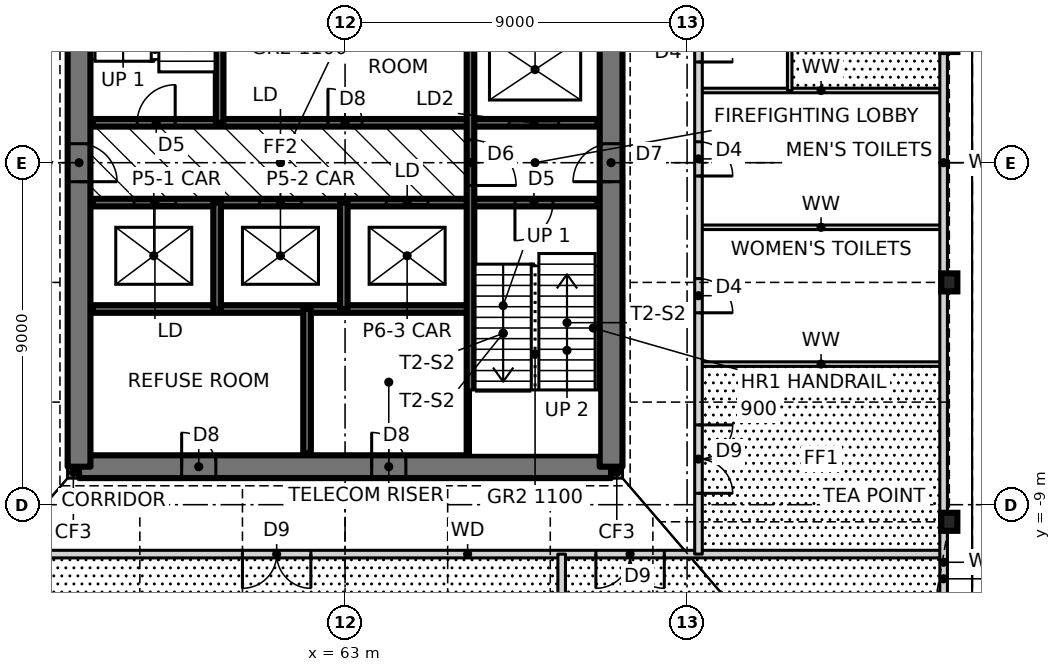
"""IFC4 building model, lengths in metres.
Left out: names, types, materials, properties, quantities, classifications, styles, units other than length and angle.
Written with IfcOpenShell. Run it as: python <this file> out.ifc"""

import sys

from ifc_helpers import new_model, si_unit, direction, frame, frame_2d, origin, origin_2d, place, context, subcontext, project, spatial, rectangle, i_section, extrude, element, fill, save


model = new_model("IFC4")
c1 = context("Model", 3, precision=1e-05, world=origin(), true_north=direction((0.0, 1.0)))
c2 = subcontext(c1, "Body", "Model", "MODEL_VIEW")
j1 = project(units=[si_unit("LENGTHUNIT", "METRE"), si_unit("PLANEANGLEUNIT", "RADIAN")], contexts=[c1])
p1 = place(None, origin())
s1 = spatial("IfcSite", under=j1, at=p1, CompositionType="ELEMENT")
p2 = place(p1, origin())
s2 = spatial("IfcBuilding", under=s1, at=p2, CompositionType="ELEMENT")
p3 = place(p2, frame((0.0, 0.0, 10.5)))
s3 = spatial("IfcBuildingStorey", under=s2, at=p3, CompositionType="ELEMENT", Elevation=10.5)
for number, where, z_axis, x_axis in (
    (1, (78.9, -9.45, 0.0), (0.0, 0.0, 1.0), (1.0, 0.0, 0.0)),
    (2, (78.9, -3.15, 0.0), (0.0, 0.0, 1.0), (1.0, 0.0, 0.0)),
):
    element("IfcColumn", number, at=place(p3, frame(where, z_axis=z_axis, x_axis=x_axis)), inside=s3, PredefinedType="COLUMN", context=c2, shape_type="SweptSolid", body=[
        extrude(i_section(OverallWidth=0.424, OverallDepth=0.475, WebThickness=0.048, FlangeThickness=0.077, at=origin_2d()), origin(), (0.0, 0.0, 1.0), 4.5),
    ])
for number, where, z_axis, x_axis in (
    (3, (55.7, -8.15, 0.0), (0.0, 0.0, 1.0), (1.0, 0.0, 0.0)),
    (4, (70.0, -8.15, 0.0), (0.0, 0.0, 1.0), (1.0, 0.0, 0.0)),
):
    element("IfcWall", number, at=place(p3, frame(where, z_axis=z_axis, x_axis=x_axis)), inside=s3, PredefinedType="SOLIDWALL", context=c2, shape_type="SweptSolid", body=[
        extrude(rectangle(XDim=0.3, YDim=0.3, at=frame_2d((0.15, 0.0))), origin(), (0.0, 0.0, 1.0), 4.5),
    ])
p4 = place(p3, frame((56.0, -8.0, 0.0), z_axis=(0.0, 0.0, 1.0), x_axis=(1.0, 0.0, 0.0)))
e5 = element("IfcWall", 5, at=p4, inside=s3, PredefinedType="SHEAR", context=c2, shape_type="SweptSolid", body=[
    extrude(rectangle(XDim=14.0, YDim=0.6, at=frame_2d((7.0, 0.0))), origin(), (0.0, 0.0, 1.0), 4.5),
])
p5 = place(p4, frame((2.7, 0.0, 0.0)))
e6 = element("IfcOpeningElement", 6, at=p5, cuts=e5, PredefinedType="OPENING", context=c2, shape_type="SweptSolid", body=[
    extrude(rectangle(XDim=0.9, YDim=2.1, at=frame_2d((0.45, 1.05))), frame((0.0, 0.31, 0.0), z_axis=(0.0, -1.0, 0.0), x_axis=(1.0, 0.0, 0.0)), (0.0, 0.0, 1.0), 0.62),
])
p6 = place(p4, frame((7.7, 0.0, 0.0)))
e7 = element("IfcOpeningElement", 7, at=p6, cuts=e5, PredefinedType="OPENING", context=c2, shape_type="SweptSolid", body=[
    extrude(rectangle(XDim=0.9, YDim=2.1, at=frame_2d((0.45, 1.05))), frame((0.0, 0.31, 0.0), z_axis=(0.0, -1.0, 0.0), x_axis=(1.0, 0.0, 0.0)), (0.0, 0.0, 1.0), 0.62),
])
p7 = place(p3, frame((70.0, -8.0, 0.0), z_axis=(0.0, 0.0, 1.0), x_axis=(0.0, 1.0, 0.0)))
e8 = element("IfcWall", 8, at=p7, inside=s3, PredefinedType="SHEAR", context=c2, shape_type="SweptSolid", body=[
    extrude(rectangle(XDim=16.0, YDim=0.6, at=frame_2d((8.0, 0.0))), origin(), (0.0, 0.0, 1.0), 4.5),
])
p8 = place(p7, frame((7.5, 0.0, 0.0)))
e9 = element("IfcOpeningElement", 9, at=p8, cuts=e8, PredefinedType="OPENING", context=c2, shape_type="SweptSolid", body=[
    extrude(rectangle(XDim=1.0, YDim=2.1, at=frame_2d((0.5, 1.05))), frame((0.0, 0.31, 0.0), z_axis=(0.0, -1.0, 0.0), x_axis=(1.0, 0.0, 0.0)), (0.0, 0.0, 1.0), 0.62),
])
p9 = place(p3, frame((56.0, 8.0, 0.0), z_axis=(0.0, 0.0, 1.0), x_axis=(0.0, -1.0, 0.0)))
e10 = element("IfcWall", 10, at=p9, inside=s3, PredefinedType="SHEAR", context=c2, shape_type="SweptSolid", body=[
    extrude(rectangle(XDim=16.0, YDim=0.6, at=frame_2d((8.0, 0.0))), origin(), (0.0, 0.0, 1.0), 4.5),
])
p10 = place(p9, frame((7.5, 0.0, 0.0)))
e11 = element("IfcOpeningElement", 11, at=p10, cuts=e10, PredefinedType="OPENING", context=c2, shape_type="SweptSolid", body=[
    extrude(rectangle(XDim=1.0, YDim=2.1, at=frame_2d((0.5, 1.05))), frame((0.0, 0.31, 0.0), z_axis=(0.0, -1.0, 0.0), x_axis=(1.0, 0.0, 0.0)), (0.0, 0.0, 1.0), 0.62),
])
p11 = place(p3, frame((53.7, -10.3, 0.0), z_axis=(0.0, 0.0, 1.0), x_axis=(1.0, 0.0, 0.0)))
e12 = element("IfcWall", 12, at=p11, inside=s3, PredefinedType="SOLIDWALL", context=c2, shape_type="SweptSolid", body=[
    extrude(rectangle(XDim=25.05, YDim=0.2, at=frame_2d((12.525, 0.0))), origin(), (0.0, 0.0, 1.0), 4.25),
])
p12 = place(p11, frame((6.6, 0.0, 0.0)))
e13 = element("IfcOpeningElement", 13, at=p12, cuts=e12, PredefinedType="OPENING", context=c2, shape_type="SweptSolid", body=[
    extrude(rectangle(XDim=1.8, YDim=2.1, at=frame_2d((0.9, 1.05))), frame((0.0, 0.11, 0.0), z_axis=(0.0, -1.0, 0.0), x_axis=(1.0, 0.0, 0.0)), (0.0, 0.0, 1.0), 0.22),
])
p13 = place(p11, frame((15.9, 0.0, 0.0)))
e14 = element("IfcOpeningElement", 14, at=p13, cuts=e12, PredefinedType="OPENING", context=c2, shape_type="SweptSolid", body=[
    extrude(rectangle(XDim=1.8, YDim=2.1, at=frame_2d((0.9, 1.05))), frame((0.0, 0.11, 0.0), z_axis=(0.0, -1.0, 0.0), x_axis=(1.0, 0.0, 0.0)), (0.0, 0.0, 1.0), 0.22),
])
p14 = place(p3, frame((72.3, -5.3, 0.0), z_axis=(0.0, 0.0, 1.0), x_axis=(1.0, 0.0, 0.0)))
e15 = element("IfcWall", 15, at=p14, inside=s3, PredefinedType="PARTITIONING", context=c2, shape_type="SweptSolid", body=[
    extrude(rectangle(XDim=6.45, YDim=0.12, at=frame_2d((3.225, 0.0))), origin(), (0.0, 0.0, 1.0), 4.25),
])
p15 = place(p3, frame((56.36, -3.85, 0.0), z_axis=(0.0, 0.0, 1.0), x_axis=(1.0, 0.0, 0.0)))
e16 = element("IfcWall", 16, at=p15, inside=s3, PredefinedType="SOLIDWALL", context=c2, shape_type="SweptSolid", body=[
    extrude(rectangle(XDim=9.94, YDim=0.2, at=frame_2d((4.97, 0.0))), origin(), (0.0, 0.0, 1.0), 4.5),
])
p16 = place(p3, frame((72.3, -1.7, 0.0), z_axis=(0.0, 0.0, 1.0), x_axis=(1.0, 0.0, 0.0)))
e17 = element("IfcWall", 17, at=p16, inside=s3, PredefinedType="PARTITIONING", context=c2, shape_type="SweptSolid", body=[
    extrude(rectangle(XDim=6.45, YDim=0.12, at=frame_2d((3.225, 0.0))), origin(), (0.0, 0.0, 1.0), 4.25),
])
p17 = place(p3, frame((56.36, -1.05, 0.0), z_axis=(0.0, 0.0, 1.0), x_axis=(1.0, 0.0, 0.0)))
e18 = element("IfcWall", 18, at=p17, inside=s3, PredefinedType="SOLIDWALL", context=c2, shape_type="SweptSolid", body=[
    extrude(rectangle(XDim=13.28, YDim=0.2, at=frame_2d((6.64, 0.0))), origin(), (0.0, 0.0, 1.0), 4.5),
])
p18 = place(p17, frame((11.11, 0.0, 0.0)))
e19 = element("IfcOpeningElement", 19, at=p18, cuts=e18, PredefinedType="OPENING", context=c2, shape_type="SweptSolid", body=[
    extrude(rectangle(XDim=1.0, YDim=2.1, at=frame_2d((0.5, 1.05))), frame((0.0, 0.11, 0.0), z_axis=(0.0, -1.0, 0.0), x_axis=(1.0, 0.0, 0.0)), (0.0, 0.0, 1.0), 0.22),
])
p19 = place(p17, frame((1.087, 0.0, 0.0)))
e20 = element("IfcOpeningElement", 20, at=p19, cuts=e18, PredefinedType="OPENING", context=c2, shape_type="SweptSolid", body=[
    extrude(rectangle(XDim=1.1, YDim=2.1, at=frame_2d((0.55, 1.05))), frame((0.0, 0.11, 0.0), z_axis=(0.0, -1.0, 0.0), x_axis=(1.0, 0.0, 0.0)), (0.0, 0.0, 1.0), 0.22),
])
p20 = place(p17, frame((4.39, 0.0, 0.0)))
e21 = element("IfcOpeningElement", 21, at=p20, cuts=e18, PredefinedType="OPENING", context=c2, shape_type="SweptSolid", body=[
    extrude(rectangle(XDim=1.1, YDim=2.1, at=frame_2d((0.55, 1.05))), frame((0.0, 0.11, 0.0), z_axis=(0.0, -1.0, 0.0), x_axis=(1.0, 0.0, 0.0)), (0.0, 0.0, 1.0), 0.22),
])
p21 = place(p17, frame((7.724, 0.0, 0.0)))
e22 = element("IfcOpeningElement", 22, at=p21, cuts=e18, PredefinedType="OPENING", context=c2, shape_type="SweptSolid", body=[
    extrude(rectangle(XDim=1.1, YDim=2.1, at=frame_2d((0.55, 1.05))), frame((0.0, 0.11, 0.0), z_axis=(0.0, -1.0, 0.0), x_axis=(1.0, 0.0, 0.0)), (0.0, 0.0, 1.0), 0.22),
])
p22 = place(p3, frame((56.36, 1.05, 0.0), z_axis=(0.0, 0.0, 1.0), x_axis=(1.0, 0.0, 0.0)))
e23 = element("IfcWall", 23, at=p22, inside=s3, PredefinedType="SOLIDWALL", context=c2, shape_type="SweptSolid", body=[
    extrude(rectangle(XDim=13.28, YDim=0.2, at=frame_2d((6.64, 0.0))), origin(), (0.0, 0.0, 1.0), 4.5),
])
p23 = place(p22, frame((1.17, 0.0, 0.0)))
e24 = element("IfcOpeningElement", 24, at=p23, cuts=e23, PredefinedType="OPENING", context=c2, shape_type="SweptSolid", body=[
    extrude(rectangle(XDim=1.0, YDim=2.1, at=frame_2d((0.5, 1.05))), frame((0.0, 0.11, 0.0), z_axis=(0.0, -1.0, 0.0), x_axis=(1.0, 0.0, 0.0)), (0.0, 0.0, 1.0), 0.22),
])
p24 = place(p22, frame((6.19, 0.0, 0.0)))
e25 = element("IfcOpeningElement", 25, at=p24, cuts=e23, PredefinedType="OPENING", context=c2, shape_type="SweptSolid", body=[
    extrude(rectangle(XDim=0.9, YDim=2.1, at=frame_2d((0.45, 1.05))), frame((0.0, 0.11, 0.0), z_axis=(0.0, -1.0, 0.0), x_axis=(1.0, 0.0, 0.0)), (0.0, 0.0, 1.0), 0.22),
])
p25 = place(p22, frame((10.96, 0.0, 0.0)))
e26 = element("IfcOpeningElement", 26, at=p25, cuts=e23, PredefinedType="OPENING", context=c2, shape_type="SweptSolid", body=[
    extrude(rectangle(XDim=1.3, YDim=2.1, at=frame_2d((0.65, 1.05))), frame((0.0, 0.11, 0.0), z_axis=(0.0, -1.0, 0.0), x_axis=(1.0, 0.0, 0.0)), (0.0, 0.0, 1.0), 0.22),
])
p26 = place(p3, frame((72.3, 1.9, 0.0), z_axis=(0.0, 0.0, 1.0), x_axis=(1.0, 0.0, 0.0)))
e27 = element("IfcWall", 27, at=p26, inside=s3, PredefinedType="PARTITIONING", context=c2, shape_type="SweptSolid", body=[
    extrude(rectangle(XDim=6.45, YDim=0.12, at=frame_2d((3.225, 0.0))), origin(), (0.0, 0.0, 1.0), 4.25),
])
p27 = place(p3, frame((74.7, 1.9, 0.0), z_axis=(0.0, 0.0, 1.0), x_axis=(0.0, 1.0, 0.0)))
e28 = element("IfcWall", 28, at=p27, inside=s3, PredefinedType="PARTITIONING", context=c2, shape_type="SweptSolid", body=[
    extrude(rectangle(XDim=2.4, YDim=0.12, at=frame_2d((1.2, 0.0))), origin(), (0.0, 0.0, 1.0), 4.25),
])
p28 = place(p3, frame((72.3, -10.3, 0.0), z_axis=(0.0, 0.0, 1.0), x_axis=(0.0, 1.0, 0.0)))
e29 = element("IfcWall", 29, at=p28, inside=s3, PredefinedType="SOLIDWALL", context=c2, shape_type="SweptSolid", body=[
    extrude(rectangle(XDim=28.3, YDim=0.2, at=frame_2d((14.15, 0.0))), origin(), (0.0, 0.0, 1.0), 4.25),
])
p29 = place(p28, frame((1.6, 0.0, 0.0)))
e30 = element("IfcOpeningElement", 30, at=p29, cuts=e29, PredefinedType="OPENING", context=c2, shape_type="SweptSolid", body=[
    extrude(rectangle(XDim=1.8, YDim=2.1, at=frame_2d((0.9, 1.05))), frame((0.0, 0.11, 0.0), z_axis=(0.0, -1.0, 0.0), x_axis=(1.0, 0.0, 0.0)), (0.0, 0.0, 1.0), 0.22),
])
p30 = place(p28, frame((6.35, 0.0, 0.0)))
e31 = element("IfcOpeningElement", 31, at=p30, cuts=e29, PredefinedType="OPENING", context=c2, shape_type="SweptSolid", body=[
    extrude(rectangle(XDim=0.9, YDim=2.1, at=frame_2d((0.45, 1.05))), frame((0.0, 0.11, 0.0), z_axis=(0.0, -1.0, 0.0), x_axis=(1.0, 0.0, 0.0)), (0.0, 0.0, 1.0), 0.22),
])
p31 = place(p28, frame((9.95, 0.0, 0.0)))
e32 = element("IfcOpeningElement", 32, at=p31, cuts=e29, PredefinedType="OPENING", context=c2, shape_type="SweptSolid", body=[
    extrude(rectangle(XDim=0.9, YDim=2.1, at=frame_2d((0.45, 1.05))), frame((0.0, 0.11, 0.0), z_axis=(0.0, -1.0, 0.0), x_axis=(1.0, 0.0, 0.0)), (0.0, 0.0, 1.0), 0.22),
])
p32 = place(p28, frame((12.95, 0.0, 0.0)))
e33 = element("IfcOpeningElement", 33, at=p32, cuts=e29, PredefinedType="OPENING", context=c2, shape_type="SweptSolid", body=[
    extrude(rectangle(XDim=0.9, YDim=2.1, at=frame_2d((0.45, 1.05))), frame((0.0, 0.11, 0.0), z_axis=(0.0, -1.0, 0.0), x_axis=(1.0, 0.0, 0.0)), (0.0, 0.0, 1.0), 0.22),
])
p33 = place(p28, frame((16.7, 0.0, 0.0)))
e34 = element("IfcOpeningElement", 34, at=p33, cuts=e29, PredefinedType="OPENING", context=c2, shape_type="SweptSolid", body=[
    extrude(rectangle(XDim=1.8, YDim=2.1, at=frame_2d((0.9, 1.05))), frame((0.0, 0.11, 0.0), z_axis=(0.0, -1.0, 0.0), x_axis=(1.0, 0.0, 0.0)), (0.0, 0.0, 1.0), 0.22),
])
p34 = place(p3, frame((68.7, -18.0, 0.0), z_axis=(0.0, 0.0, 1.0), x_axis=(0.0, 1.0, 0.0)))
e35 = element("IfcWall", 35, at=p34, inside=s3, PredefinedType="SOLIDWALL", context=c2, shape_type="SweptSolid", body=[
    extrude(rectangle(XDim=7.7, YDim=0.2, at=frame_2d((3.85, 0.0))), origin(), (0.0, 0.0, 1.0), 4.25),
])
p35 = place(p3, frame((66.3, -7.64, 0.0), z_axis=(0.0, 0.0, 1.0), x_axis=(0.0, 1.0, 0.0)))
e36 = element("IfcWall", 36, at=p35, inside=s3, PredefinedType="SOLIDWALL", context=c2, shape_type="SweptSolid", body=[
    extrude(rectangle(XDim=11.49, YDim=0.2, at=frame_2d((5.745, 0.0))), origin(), (0.0, 0.0, 1.0), 4.5),
])
p36 = place(p35, frame((7.04, 0.0, 0.0)))
e37 = element("IfcOpeningElement", 37, at=p36, cuts=e36, PredefinedType="OPENING", context=c2, shape_type="SweptSolid", body=[
    extrude(rectangle(XDim=1.2, YDim=2.1, at=frame_2d((0.6, 1.05))), frame((0.0, 0.11, 0.0), z_axis=(0.0, -1.0, 0.0), x_axis=(1.0, 0.0, 0.0)), (0.0, 0.0, 1.0), 0.22),
])
p37 = place(p3, frame((62.967, -3.85, 0.0), z_axis=(0.0, 0.0, 1.0), x_axis=(0.0, 1.0, 0.0)))
e38 = element("IfcWall", 38, at=p37, inside=s3, PredefinedType="SOLIDWALL", context=c2, shape_type="SweptSolid", body=[
    extrude(rectangle(XDim=2.8, YDim=0.2, at=frame_2d((1.4, 0.0))), origin(), (0.0, 0.0, 1.0), 4.5),
])
p38 = place(p3, frame((62.0, -7.64, 0.0), z_axis=(0.0, 0.0, 1.0), x_axis=(0.0, 1.0, 0.0)))
e39 = element("IfcWall", 39, at=p38, inside=s3, PredefinedType="SOLIDWALL", context=c2, shape_type="SweptSolid", body=[
    extrude(rectangle(XDim=3.79, YDim=0.2, at=frame_2d((1.895, 0.0))), origin(), (0.0, 0.0, 1.0), 4.5),
])
p39 = place(p3, frame((59.7, 1.05, 0.0), z_axis=(0.0, 0.0, 1.0), x_axis=(0.0, 1.0, 0.0)))
e40 = element("IfcWall", 40, at=p39, inside=s3, PredefinedType="SOLIDWALL", context=c2, shape_type="SweptSolid", body=[
    extrude(rectangle(XDim=6.59, YDim=0.2, at=frame_2d((3.295, 0.0))), origin(), (0.0, 0.0, 1.0), 4.5),
])
p40 = place(p3, frame((59.633, -3.85, 0.0), z_axis=(0.0, 0.0, 1.0), x_axis=(0.0, 1.0, 0.0)))
e41 = element("IfcWall", 41, at=p40, inside=s3, PredefinedType="SOLIDWALL", context=c2, shape_type="SweptSolid", body=[
    extrude(rectangle(XDim=2.8, YDim=0.2, at=frame_2d((1.4, 0.0))), origin(), (0.0, 0.0, 1.0), 4.5),
])
p41 = place(p3, frame((78.75, -11.602, 0.0), z_axis=(0.0, 0.0, 1.0), x_axis=(0.0, 1.0, 0.0)))
e42 = element("IfcWall", 42, at=p41, inside=s3, PredefinedType="SOLIDWALL", context=c2, shape_type="SweptSolid", body=[
    extrude(rectangle(XDim=2.174, YDim=0.2, at=frame_2d((1.087, 0.0))), origin(), (0.0, 0.0, 1.0), 3.587),
])
p42 = place(p3, frame((78.75, -9.428, 0.0), z_axis=(0.0, 0.0, 1.0), x_axis=(0.0, 1.0, 0.0)))
e43 = element("IfcWall", 43, at=p42, inside=s3, PredefinedType="SOLIDWALL", context=c2, shape_type="SweptSolid", body=[
    extrude(rectangle(XDim=18.856, YDim=0.2, at=frame_2d((9.428, 0.0))), origin(), (0.0, 0.0, 1.0), 4.25),
])
p43 = place(p23, origin())
e44 = element("IfcDoor", 44, at=p43, inside=s3, OperationType="SINGLE_SWING_RIGHT", PredefinedType="DOOR", context=c2, shape_type="SweptSolid", body=[
    extrude(rectangle(XDim=1.0, YDim=2.1, at=frame_2d((0.5, 1.05))), frame((0.0, 0.025, 0.0), z_axis=(0.0, -1.0, 0.0), x_axis=(1.0, 0.0, 0.0)), (0.0, 0.0, 1.0), 0.05),
])
fill(e24, e44)
p44 = place(p18, frame((1.0, 0.0, 0.0), z_axis=(0.0, 0.0, 1.0), x_axis=(-1.0, 0.0, 0.0)))
e45 = element("IfcDoor", 45, at=p44, inside=s3, OperationType="SINGLE_SWING_RIGHT", PredefinedType="DOOR", context=c2, shape_type="SweptSolid", body=[
    extrude(rectangle(XDim=1.0, YDim=2.1, at=frame_2d((0.5, 1.05))), frame((0.0, 0.025, 0.0), z_axis=(0.0, -1.0, 0.0), x_axis=(1.0, 0.0, 0.0)), (0.0, 0.0, 1.0), 0.05),
])
fill(e19, e45)
p45 = place(p36, frame((1.2, 0.0, 0.0), z_axis=(0.0, 0.0, 1.0), x_axis=(-1.0, 0.0, 0.0)))
e46 = element("IfcDoor", 46, at=p45, inside=s3, OperationType="SINGLE_SWING_RIGHT", PredefinedType="DOOR", context=c2, shape_type="SweptSolid", body=[
    extrude(rectangle(XDim=1.2, YDim=2.1, at=frame_2d((0.6, 1.05))), frame((0.0, 0.025, 0.0), z_axis=(0.0, -1.0, 0.0), x_axis=(1.0, 0.0, 0.0)), (0.0, 0.0, 1.0), 0.05),
])
fill(e37, e46)
p46 = place(p24, origin())
e47 = element("IfcDoor", 47, at=p46, inside=s3, OperationType="SINGLE_SWING_LEFT", PredefinedType="DOOR", context=c2, shape_type="SweptSolid", body=[
    extrude(rectangle(XDim=0.9, YDim=2.1, at=frame_2d((0.45, 1.05))), frame((0.0, 0.025, 0.0), z_axis=(0.0, -1.0, 0.0), x_axis=(1.0, 0.0, 0.0)), (0.0, 0.0, 1.0), 0.05),
])
fill(e25, e47)
p47 = place(p12, frame((1.8, 0.0, 0.0), z_axis=(0.0, 0.0, 1.0), x_axis=(-1.0, 0.0, 0.0)))
e48 = element("IfcDoor", 48, at=p47, inside=s3, OperationType="DOUBLE_DOOR_SINGLE_SWING", PredefinedType="DOOR", context=c2, shape_type="SweptSolid", body=[
    extrude(rectangle(XDim=1.8, YDim=2.1, at=frame_2d((0.9, 1.05))), frame((0.0, 0.025, 0.0), z_axis=(0.0, -1.0, 0.0), x_axis=(1.0, 0.0, 0.0)), (0.0, 0.0, 1.0), 0.05),
])
fill(e13, e48)
p48 = place(p13, frame((1.8, 0.0, 0.0), z_axis=(0.0, 0.0, 1.0), x_axis=(-1.0, 0.0, 0.0)))
e49 = element("IfcDoor", 49, at=p48, inside=s3, OperationType="DOUBLE_DOOR_SINGLE_SWING", PredefinedType="DOOR", context=c2, shape_type="SweptSolid", body=[
    extrude(rectangle(XDim=1.8, YDim=2.1, at=frame_2d((0.9, 1.05))), frame((0.0, 0.025, 0.0), z_axis=(0.0, -1.0, 0.0), x_axis=(1.0, 0.0, 0.0)), (0.0, 0.0, 1.0), 0.05),
])
fill(e14, e49)
p49 = place(p29, frame((1.8, 0.0, 0.0), z_axis=(0.0, 0.0, 1.0), x_axis=(-1.0, 0.0, 0.0)))
e50 = element("IfcDoor", 50, at=p49, inside=s3, OperationType="DOUBLE_DOOR_SINGLE_SWING", PredefinedType="DOOR", context=c2, shape_type="SweptSolid", body=[
    extrude(rectangle(XDim=1.8, YDim=2.1, at=frame_2d((0.9, 1.05))), frame((0.0, 0.025, 0.0), z_axis=(0.0, -1.0, 0.0), x_axis=(1.0, 0.0, 0.0)), (0.0, 0.0, 1.0), 0.05),
])
fill(e30, e50)
p50 = place(p30, frame((0.9, 0.0, 0.0), z_axis=(0.0, 0.0, 1.0), x_axis=(-1.0, 0.0, 0.0)))
e51 = element("IfcDoor", 51, at=p50, inside=s3, OperationType="SINGLE_SWING_RIGHT", PredefinedType="DOOR", context=c2, shape_type="SweptSolid", body=[
    extrude(rectangle(XDim=0.9, YDim=2.1, at=frame_2d((0.45, 1.05))), frame((0.0, 0.025, 0.0), z_axis=(0.0, -1.0, 0.0), x_axis=(1.0, 0.0, 0.0)), (0.0, 0.0, 1.0), 0.05),
])
fill(e31, e51)
p51 = place(p31, frame((0.9, 0.0, 0.0), z_axis=(0.0, 0.0, 1.0), x_axis=(-1.0, 0.0, 0.0)))
e52 = element("IfcDoor", 52, at=p51, inside=s3, OperationType="SINGLE_SWING_RIGHT", PredefinedType="DOOR", context=c2, shape_type="SweptSolid", body=[
    extrude(rectangle(XDim=0.9, YDim=2.1, at=frame_2d((0.45, 1.05))), frame((0.0, 0.025, 0.0), z_axis=(0.0, -1.0, 0.0), x_axis=(1.0, 0.0, 0.0)), (0.0, 0.0, 1.0), 0.05),
])
fill(e32, e52)
p52 = place(p32, frame((0.9, 0.0, 0.0), z_axis=(0.0, 0.0, 1.0), x_axis=(-1.0, 0.0, 0.0)))
e53 = element("IfcDoor", 53, at=p52, inside=s3, OperationType="SINGLE_SWING_RIGHT", PredefinedType="DOOR", context=c2, shape_type="SweptSolid", body=[
    extrude(rectangle(XDim=0.9, YDim=2.1, at=frame_2d((0.45, 1.05))), frame((0.0, 0.025, 0.0), z_axis=(0.0, -1.0, 0.0), x_axis=(1.0, 0.0, 0.0)), (0.0, 0.0, 1.0), 0.05),
])
fill(e33, e53)
p53 = place(p10, origin())
e54 = element("IfcDoor", 54, at=p53, inside=s3, OperationType="SINGLE_SWING_RIGHT", PredefinedType="DOOR", context=c2, shape_type="SweptSolid", body=[
    extrude(rectangle(XDim=1.0, YDim=2.1, at=frame_2d((0.5, 1.05))), frame((0.0, 0.025, 0.0), z_axis=(0.0, -1.0, 0.0), x_axis=(1.0, 0.0, 0.0)), (0.0, 0.0, 1.0), 0.05),
])
fill(e11, e54)
p54 = place(p8, origin())
e55 = element("IfcDoor", 55, at=p54, inside=s3, OperationType="SINGLE_SWING_LEFT", PredefinedType="DOOR", context=c2, shape_type="SweptSolid", body=[
    extrude(rectangle(XDim=1.0, YDim=2.1, at=frame_2d((0.5, 1.05))), frame((0.0, 0.025, 0.0), z_axis=(0.0, -1.0, 0.0), x_axis=(1.0, 0.0, 0.0)), (0.0, 0.0, 1.0), 0.05),
])
fill(e9, e55)
p55 = place(p5, origin())
e56 = element("IfcDoor", 56, at=p55, inside=s3, OperationType="SINGLE_SWING_LEFT", PredefinedType="DOOR", context=c2, shape_type="SweptSolid", body=[
    extrude(rectangle(XDim=0.9, YDim=2.1, at=frame_2d((0.45, 1.05))), frame((0.0, 0.025, 0.0), z_axis=(0.0, -1.0, 0.0), x_axis=(1.0, 0.0, 0.0)), (0.0, 0.0, 1.0), 0.05),
])
fill(e6, e56)
p56 = place(p6, origin())
e57 = element("IfcDoor", 57, at=p56, inside=s3, OperationType="SINGLE_SWING_LEFT", PredefinedType="DOOR", context=c2, shape_type="SweptSolid", body=[
    extrude(rectangle(XDim=0.9, YDim=2.1, at=frame_2d((0.45, 1.05))), frame((0.0, 0.025, 0.0), z_axis=(0.0, -1.0, 0.0), x_axis=(1.0, 0.0, 0.0)), (0.0, 0.0, 1.0), 0.05),
])
fill(e7, e57)
p57 = place(p19, origin())
e58 = element("IfcDoor", 58, at=p57, inside=s3, OperationType="DOUBLE_DOOR_SLIDING", PredefinedType="DOOR", context=c2, shape_type="SweptSolid", body=[
    extrude(rectangle(XDim=1.1, YDim=2.1, at=frame_2d((0.55, 1.05))), frame((0.0, 0.025, 0.0), z_axis=(0.0, -1.0, 0.0), x_axis=(1.0, 0.0, 0.0)), (0.0, 0.0, 1.0), 0.05),
])
fill(e20, e58)
p58 = place(p20, origin())
e59 = element("IfcDoor", 59, at=p58, inside=s3, OperationType="DOUBLE_DOOR_SLIDING", PredefinedType="DOOR", context=c2, shape_type="SweptSolid", body=[
    extrude(rectangle(XDim=1.1, YDim=2.1, at=frame_2d((0.55, 1.05))), frame((0.0, 0.025, 0.0), z_axis=(0.0, -1.0, 0.0), x_axis=(1.0, 0.0, 0.0)), (0.0, 0.0, 1.0), 0.05),
])
fill(e21, e59)
p59 = place(p21, origin())
e60 = element("IfcDoor", 60, at=p59, inside=s3, OperationType="DOUBLE_DOOR_SLIDING", PredefinedType="DOOR", context=c2, shape_type="SweptSolid", body=[
    extrude(rectangle(XDim=1.1, YDim=2.1, at=frame_2d((0.55, 1.05))), frame((0.0, 0.025, 0.0), z_axis=(0.0, -1.0, 0.0), x_axis=(1.0, 0.0, 0.0)), (0.0, 0.0, 1.0), 0.05),
])
fill(e22, e60)
p60 = place(p25, origin())
e61 = element("IfcDoor", 61, at=p60, inside=s3, OperationType="SLIDING_TO_LEFT", PredefinedType="DOOR", context=c2, shape_type="SweptSolid", body=[
    extrude(rectangle(XDim=1.3, YDim=2.1, at=frame_2d((0.65, 1.05))), frame((0.0, 0.025, 0.0), z_axis=(0.0, -1.0, 0.0), x_axis=(1.0, 0.0, 0.0)), (0.0, 0.0, 1.0), 0.05),
])
fill(e26, e61)
save(model, sys.argv[1])
